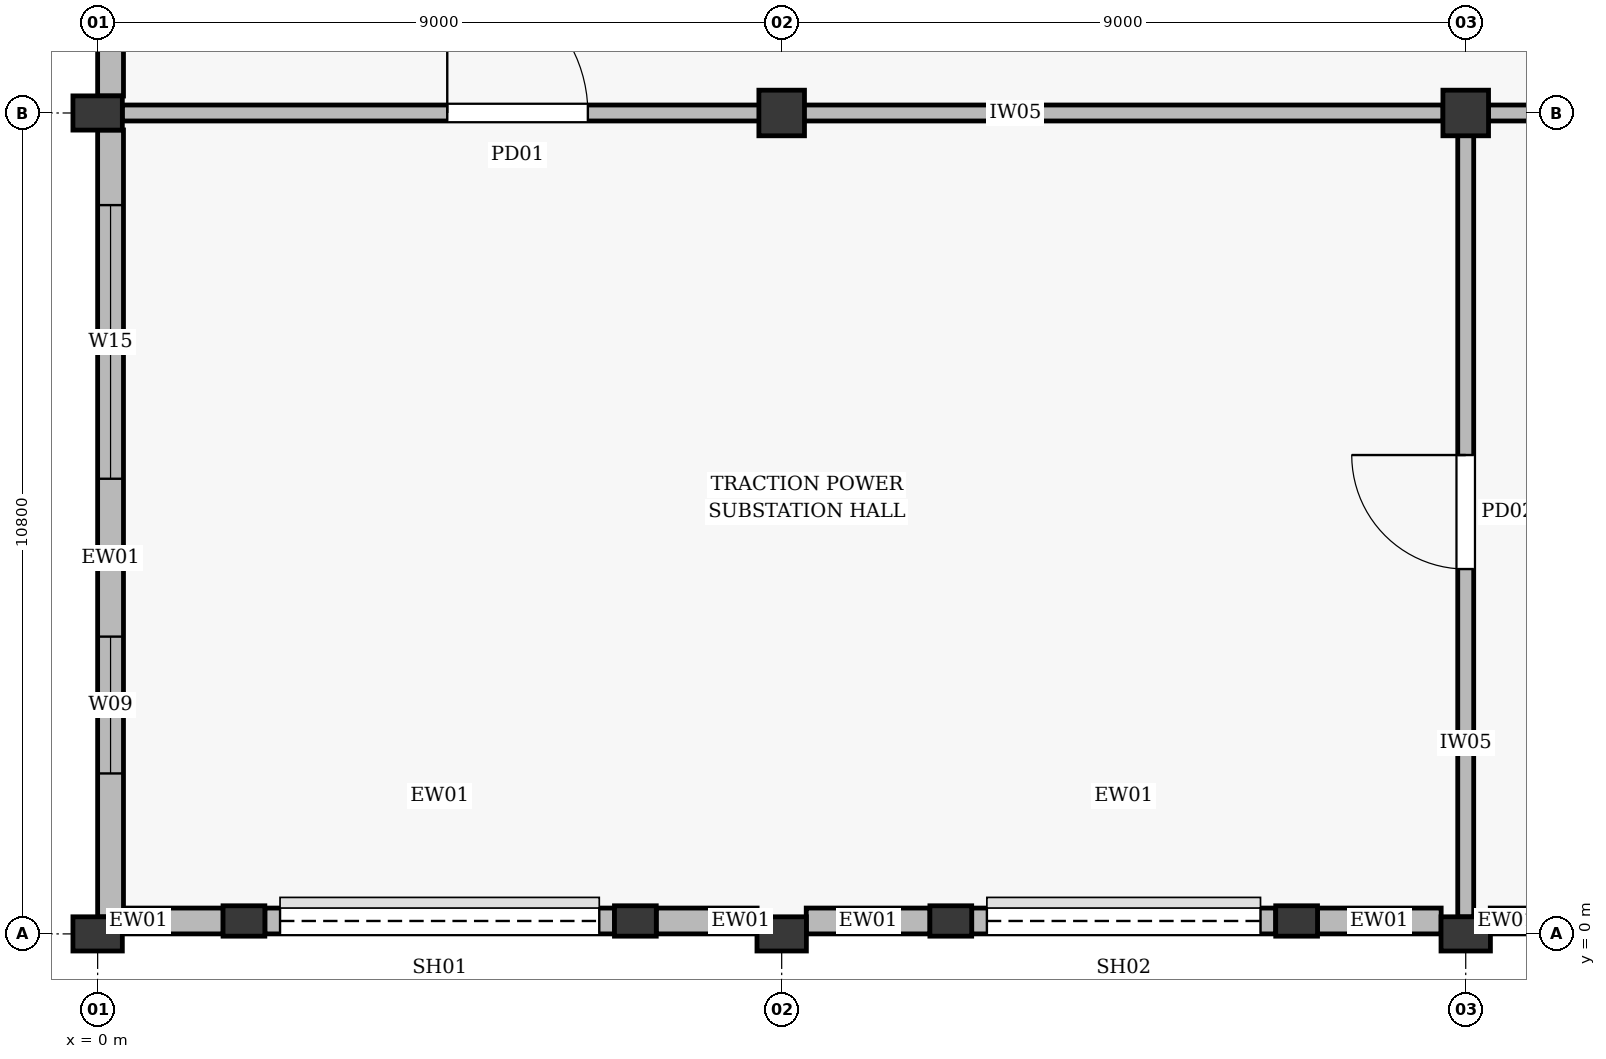
"""IFC4 building model, lengths in metres.
Left out: names, types, materials, properties, quantities, classifications, styles, units other than length and angle.
Written with IfcOpenShell. Run it as: python <this file> out.ifc"""

import sys

from ifc_helpers import new_model, si_unit, direction, frame, frame_2d, origin, origin_2d, place, context, subcontext, project, spatial, rectangle, extrude, element, fill, save


model = new_model("IFC4")
c1 = context("Model", 3, precision=1e-05, world=origin(), true_north=direction((0.0, 1.0)))
c2 = subcontext(c1, "Body", "Model", "MODEL_VIEW")
j1 = project(units=[si_unit("LENGTHUNIT", "METRE"), si_unit("PLANEANGLEUNIT", "RADIAN")], contexts=[c1])
p1 = place(None, origin())
s1 = spatial("IfcSite", under=j1, at=p1, CompositionType="ELEMENT")
p2 = place(p1, origin())
s2 = spatial("IfcBuilding", under=s1, at=p2, CompositionType="ELEMENT")
p3 = place(p2, origin())
s3 = spatial("IfcBuildingStorey", under=s2, at=p3, CompositionType="ELEMENT", Elevation=0.0)
for number, where, z_axis, x_axis in (
    (1, (0.0, 0.0, 0.0), (0.0, 0.0, 1.0), (1.0, 0.0, 0.0)),
    (2, (0.0, 10.8, 0.0), (0.0, 0.0, 1.0), (1.0, 0.0, 0.0)),
    (3, (9.0, 0.0, 0.0), (0.0, 0.0, 1.0), (1.0, 0.0, 0.0)),
):
    element("IfcColumn", number, at=place(p3, frame(where, z_axis=z_axis, x_axis=x_axis)), inside=s3, PredefinedType="PILASTER", context=c2, shape_type="SweptSolid", body=[
        extrude(rectangle(XDim=0.65, YDim=0.45, at=origin_2d()), origin(), (0.0, 0.0, 1.0), 6.6),
    ])
p4 = place(p3, frame((9.0, 10.8, 0.0), z_axis=(0.0, 0.0, 1.0), x_axis=(1.0, 0.0, 0.0)))
e4 = element("IfcColumn", 4, at=p4, inside=s3, PredefinedType="COLUMN", context=c2, shape_type="SweptSolid", body=[
    extrude(rectangle(XDim=0.6, YDim=0.6, at=origin_2d()), origin(), (0.0, 0.0, 1.0), 6.6),
])
p5 = place(p3, frame((18.0, 0.0, 0.0), z_axis=(0.0, 0.0, 1.0), x_axis=(1.0, 0.0, 0.0)))
e5 = element("IfcColumn", 5, at=p5, inside=s3, PredefinedType="PILASTER", context=c2, shape_type="SweptSolid", body=[
    extrude(rectangle(XDim=0.65, YDim=0.45, at=origin_2d()), origin(), (0.0, 0.0, 1.0), 6.6),
])
p6 = place(p3, frame((18.0, 10.8, 0.0), z_axis=(0.0, 0.0, 1.0), x_axis=(1.0, 0.0, 0.0)))
e6 = element("IfcColumn", 6, at=p6, inside=s3, PredefinedType="COLUMN", context=c2, shape_type="SweptSolid", body=[
    extrude(rectangle(XDim=0.6, YDim=0.6, at=origin_2d()), origin(), (0.0, 0.0, 1.0), 6.6),
])
for number, where, z_axis, x_axis in (
    (7, (1.925, 0.17, 0.0), (0.0, 0.0, 1.0), (1.0, 0.0, 0.0)),
    (8, (7.075, 0.17, 0.0), (0.0, 0.0, 1.0), (1.0, 0.0, 0.0)),
):
    element("IfcColumn", number, at=place(p3, frame(where, z_axis=z_axis, x_axis=x_axis)), inside=s3, PredefinedType="PILASTER", context=c2, shape_type="SweptSolid", body=[
        extrude(rectangle(XDim=0.55, YDim=0.4, at=origin_2d()), origin(), (0.0, 0.0, 1.0), 4.3),
    ])
for number, where, z_axis, x_axis in (
    (9, (0.323, 0.17, 0.0), (0.0, 0.0, 1.0), (1.0, 0.0, 0.0)),
    (10, (7.348, 0.17, 0.0), (0.0, 0.0, 1.0), (1.0, 0.0, 0.0)),
):
    element("IfcWall", number, at=place(p3, frame(where, z_axis=z_axis, x_axis=x_axis)), inside=s3, PredefinedType="STANDARD", context=c2, shape_type="SweptSolid", body=[
        extrude(rectangle(XDim=1.329, YDim=0.34, at=frame_2d((0.665, 0.0))), origin(), (0.0, 0.0, 1.0), 4.28),
    ])
p7 = place(p3, frame((2.2, 0.17, 0.0), z_axis=(0.0, 0.0, 1.0), x_axis=(1.0, 0.0, 0.0)))
e11 = element("IfcWall", 11, at=p7, inside=s3, PredefinedType="STANDARD", context=c2, shape_type="SweptSolid", body=[
    extrude(rectangle(XDim=4.6, YDim=0.34, at=frame_2d((2.3, 0.0))), origin(), (0.0, 0.0, 1.0), 4.26),
])
p8 = place(p7, frame((0.2, 0.0, 0.005)))
e12 = element("IfcOpeningElement", 12, at=p8, cuts=e11, PredefinedType="OPENING", context=c2, shape_type="SweptSolid", body=[
    extrude(rectangle(XDim=4.2, YDim=3.6, at=frame_2d((2.1, 1.8))), frame((0.0, 0.182, 0.0), z_axis=(0.0, -1.0, 0.0), x_axis=(1.0, 0.0, 0.0)), (0.0, 0.0, 1.0), 0.364),
])
for number, where, z_axis, x_axis in (
    (13, (11.225, 0.17, 0.0), (0.0, 0.0, 1.0), (1.0, 0.0, 0.0)),
    (14, (15.775, 0.17, 0.0), (0.0, 0.0, 1.0), (1.0, 0.0, 0.0)),
):
    element("IfcColumn", number, at=place(p3, frame(where, z_axis=z_axis, x_axis=x_axis)), inside=s3, PredefinedType="PILASTER", context=c2, shape_type="SweptSolid", body=[
        extrude(rectangle(XDim=0.55, YDim=0.4, at=origin_2d()), origin(), (0.0, 0.0, 1.0), 4.3),
    ])
for number, where, z_axis, x_axis in (
    (15, (9.323, 0.17, 0.0), (0.0, 0.0, 1.0), (1.0, 0.0, 0.0)),
    (16, (16.048, 0.17, 0.0), (0.0, 0.0, 1.0), (1.0, 0.0, 0.0)),
):
    element("IfcWall", number, at=place(p3, frame(where, z_axis=z_axis, x_axis=x_axis)), inside=s3, PredefinedType="STANDARD", context=c2, shape_type="SweptSolid", body=[
        extrude(rectangle(XDim=1.629, YDim=0.34, at=frame_2d((0.814, 0.0))), origin(), (0.0, 0.0, 1.0), 4.28),
    ])
p9 = place(p3, frame((11.5, 0.17, 0.0), z_axis=(0.0, 0.0, 1.0), x_axis=(1.0, 0.0, 0.0)))
e17 = element("IfcWall", 17, at=p9, inside=s3, PredefinedType="STANDARD", context=c2, shape_type="SweptSolid", body=[
    extrude(rectangle(XDim=4.0, YDim=0.34, at=frame_2d((2.0, 0.0))), origin(), (0.0, 0.0, 1.0), 4.26),
])
p10 = place(p9, frame((0.2, 0.0, 0.005)))
e18 = element("IfcOpeningElement", 18, at=p10, cuts=e17, PredefinedType="OPENING", context=c2, shape_type="SweptSolid", body=[
    extrude(rectangle(XDim=3.6, YDim=3.2, at=frame_2d((1.8, 1.6))), frame((0.0, 0.182, 0.0), z_axis=(0.0, -1.0, 0.0), x_axis=(1.0, 0.0, 0.0)), (0.0, 0.0, 1.0), 0.364),
])
p11 = place(p3, frame((18.323, 0.17, 0.0), z_axis=(0.0, 0.0, 1.0), x_axis=(1.0, 0.0, 0.0)))
e19 = element("IfcWall", 19, at=p11, inside=s3, PredefinedType="STANDARD", context=c2, shape_type="SweptSolid", body=[
    extrude(rectangle(XDim=1.329, YDim=0.34, at=frame_2d((0.665, 0.0))), origin(), (0.0, 0.0, 1.0), 4.28),
])
p12 = place(p3, frame((0.17, 0.223, 0.0), z_axis=(0.0, 0.0, 1.0), x_axis=(0.0, 1.0, 0.0)))
e20 = element("IfcWall", 20, at=p12, inside=s3, PredefinedType="STANDARD", context=c2, shape_type="SweptSolid", body=[
    extrude(rectangle(XDim=10.354, YDim=0.34, at=frame_2d((5.177, 0.0))), origin(), (0.0, 0.0, 1.0), 5.55),
])
p13 = place(p12, frame((1.888, 0.0, 0.75)))
e21 = element("IfcOpeningElement", 21, at=p13, cuts=e20, PredefinedType="OPENING", context=c2, shape_type="SweptSolid", body=[
    extrude(rectangle(XDim=1.8, YDim=2.2, at=frame_2d((0.9, 1.1))), frame((0.0, 0.182, 0.0), z_axis=(0.0, -1.0, 0.0), x_axis=(1.0, 0.0, 0.0)), (0.0, 0.0, 1.0), 0.364),
])
p14 = place(p12, frame((5.765, 0.0, 1.05)))
e22 = element("IfcOpeningElement", 22, at=p14, cuts=e20, PredefinedType="OPENING", context=c2, shape_type="SweptSolid", body=[
    extrude(rectangle(XDim=3.6, YDim=1.4, at=frame_2d((1.8, 0.7))), frame((0.0, 0.182, 0.0), z_axis=(0.0, -1.0, 0.0), x_axis=(1.0, 0.0, 0.0)), (0.0, 0.0, 1.0), 0.364),
])
p15 = place(p3, frame((0.17, 11.023, 0.0), z_axis=(0.0, 0.0, 1.0), x_axis=(0.0, 1.0, 0.0)))
e23 = element("IfcWall", 23, at=p15, inside=s3, PredefinedType="STANDARD", context=c2, shape_type="SweptSolid", body=[
    extrude(rectangle(XDim=10.329, YDim=0.34, at=frame_2d((5.165, 0.0))), origin(), (0.0, 0.0, 1.0), 5.55),
])
p16 = place(p15, frame((1.882, 0.0, 0.75)))
e24 = element("IfcOpeningElement", 24, at=p16, cuts=e23, PredefinedType="OPENING", context=c2, shape_type="SweptSolid", body=[
    extrude(rectangle(XDim=1.8, YDim=2.2, at=frame_2d((0.9, 1.1))), frame((0.0, 0.182, 0.0), z_axis=(0.0, -1.0, 0.0), x_axis=(1.0, 0.0, 0.0)), (0.0, 0.0, 1.0), 0.364),
])
p17 = place(p15, frame((5.747, 0.0, 1.05)))
e25 = element("IfcOpeningElement", 25, at=p17, cuts=e23, PredefinedType="OPENING", context=c2, shape_type="SweptSolid", body=[
    extrude(rectangle(XDim=3.6, YDim=1.4, at=frame_2d((1.8, 0.7))), frame((0.0, 0.182, 0.0), z_axis=(0.0, -1.0, 0.0), x_axis=(1.0, 0.0, 0.0)), (0.0, 0.0, 1.0), 0.364),
])
p18 = place(p3, frame((0.323, 10.8, 0.0), z_axis=(0.0, 0.0, 1.0), x_axis=(1.0, 0.0, 0.0)))
e26 = element("IfcWall", 26, at=p18, inside=s3, PredefinedType="PARTITIONING", context=c2, shape_type="SweptSolid", body=[
    extrude(rectangle(XDim=17.379, YDim=0.21, at=frame_2d((8.689, 0.0))), origin(), (0.0, 0.0, 1.0), 5.93),
])
p19 = place(p18, frame((4.277, 0.0, 0.005)))
e27 = element("IfcOpeningElement", 27, at=p19, cuts=e26, PredefinedType="OPENING", context=c2, shape_type="SweptSolid", body=[
    extrude(rectangle(XDim=1.85, YDim=2.35, at=frame_2d((0.925, 1.175))), frame((0.0, 0.117, 0.0), z_axis=(0.0, -1.0, 0.0), x_axis=(1.0, 0.0, 0.0)), (0.0, 0.0, 1.0), 0.234),
])
p20 = place(p3, frame((18.298, 10.8, 0.0), z_axis=(0.0, 0.0, 1.0), x_axis=(1.0, 0.0, 0.0)))
e28 = element("IfcWall", 28, at=p20, inside=s3, PredefinedType="PARTITIONING", context=c2, shape_type="SweptSolid", body=[
    extrude(rectangle(XDim=26.379, YDim=0.21, at=frame_2d((13.189, 0.0))), origin(), (0.0, 0.0, 1.0), 5.93),
])
p21 = place(p20, frame((11.502, 0.0, 0.005)))
e29 = element("IfcOpeningElement", 29, at=p21, cuts=e28, PredefinedType="OPENING", context=c2, shape_type="SweptSolid", body=[
    extrude(rectangle(XDim=1.5, YDim=2.25, at=frame_2d((0.75, 1.125))), frame((0.0, 0.117, 0.0), z_axis=(0.0, -1.0, 0.0), x_axis=(1.0, 0.0, 0.0)), (0.0, 0.0, 1.0), 0.234),
])
p22 = place(p3, frame((18.0, 0.223, 0.0), z_axis=(0.0, 0.0, 1.0), x_axis=(0.0, 1.0, 0.0)))
e30 = element("IfcWall", 30, at=p22, inside=s3, PredefinedType="PARTITIONING", context=c2, shape_type="SweptSolid", body=[
    extrude(rectangle(XDim=10.477, YDim=0.21, at=frame_2d((5.239, 0.0))), origin(), (0.0, 0.0, 1.0), 5.57),
])
p23 = place(p22, frame((4.577, 0.0, 0.005)))
e31 = element("IfcOpeningElement", 31, at=p23, cuts=e30, PredefinedType="OPENING", context=c2, shape_type="SweptSolid", body=[
    extrude(rectangle(XDim=1.5, YDim=2.25, at=frame_2d((0.75, 1.125))), frame((0.0, 0.117, 0.0), z_axis=(0.0, -1.0, 0.0), x_axis=(1.0, 0.0, 0.0)), (0.0, 0.0, 1.0), 0.234),
])
p24 = place(p8, origin())
e32 = element("IfcDoor", 32, at=p24, inside=s3, OperationType="ROLLINGUP", PredefinedType="GATE", context=c2, shape_type="SweptSolid", body=[
    extrude(rectangle(XDim=4.2, YDim=3.6, at=frame_2d((2.1, 1.8))), frame((0.0, 0.025, 0.0), z_axis=(0.0, -1.0, 0.0), x_axis=(1.0, 0.0, 0.0)), (0.0, 0.0, 1.0), 0.05),
])
fill(e12, e32)
p25 = place(p10, origin())
e33 = element("IfcDoor", 33, at=p25, inside=s3, OperationType="ROLLINGUP", PredefinedType="GATE", context=c2, shape_type="SweptSolid", body=[
    extrude(rectangle(XDim=3.6, YDim=3.2, at=frame_2d((1.8, 1.6))), frame((0.0, 0.025, 0.0), z_axis=(0.0, -1.0, 0.0), x_axis=(1.0, 0.0, 0.0)), (0.0, 0.0, 1.0), 0.05),
])
fill(e18, e33)
p26 = place(p13, origin())
e34 = element("IfcWindow", 34, at=p26, inside=s3, PartitioningType="DOUBLE_PANEL_VERTICAL", PredefinedType="WINDOW", context=c2, shape_type="SweptSolid", body=[
    extrude(rectangle(XDim=1.8, YDim=2.2, at=frame_2d((0.9, 1.1))), frame((0.0, 0.03, 0.0), z_axis=(0.0, -1.0, 0.0), x_axis=(1.0, 0.0, 0.0)), (0.0, 0.0, 1.0), 0.06),
])
fill(e21, e34)
p27 = place(p14, origin())
e35 = element("IfcWindow", 35, at=p27, inside=s3, PartitioningType="DOUBLE_PANEL_VERTICAL", PredefinedType="WINDOW", context=c2, shape_type="SweptSolid", body=[
    extrude(rectangle(XDim=3.6, YDim=1.4, at=frame_2d((1.8, 0.7))), frame((0.0, 0.03, 0.0), z_axis=(0.0, -1.0, 0.0), x_axis=(1.0, 0.0, 0.0)), (0.0, 0.0, 1.0), 0.06),
])
fill(e22, e35)
p28 = place(p19, origin())
e36 = element("IfcDoor", 36, at=p28, inside=s3, OperationType="DOUBLE_DOOR_SINGLE_SWING", PredefinedType="DOOR", context=c2, shape_type="SweptSolid", body=[
    extrude(rectangle(XDim=1.85, YDim=2.35, at=frame_2d((0.925, 1.175))), frame((0.0, 0.025, 0.0), z_axis=(0.0, -1.0, 0.0), x_axis=(1.0, 0.0, 0.0)), (0.0, 0.0, 1.0), 0.05),
])
fill(e27, e36)
p29 = place(p23, origin())
e37 = element("IfcDoor", 37, at=p29, inside=s3, OperationType="SINGLE_SWING_RIGHT", PredefinedType="DOOR", context=c2, shape_type="SweptSolid", body=[
    extrude(rectangle(XDim=1.5, YDim=2.25, at=frame_2d((0.75, 1.125))), frame((0.0, 0.025, 0.0), z_axis=(0.0, -1.0, 0.0), x_axis=(1.0, 0.0, 0.0)), (0.0, 0.0, 1.0), 0.05),
])
fill(e31, e37)
save(model, sys.argv[1])
